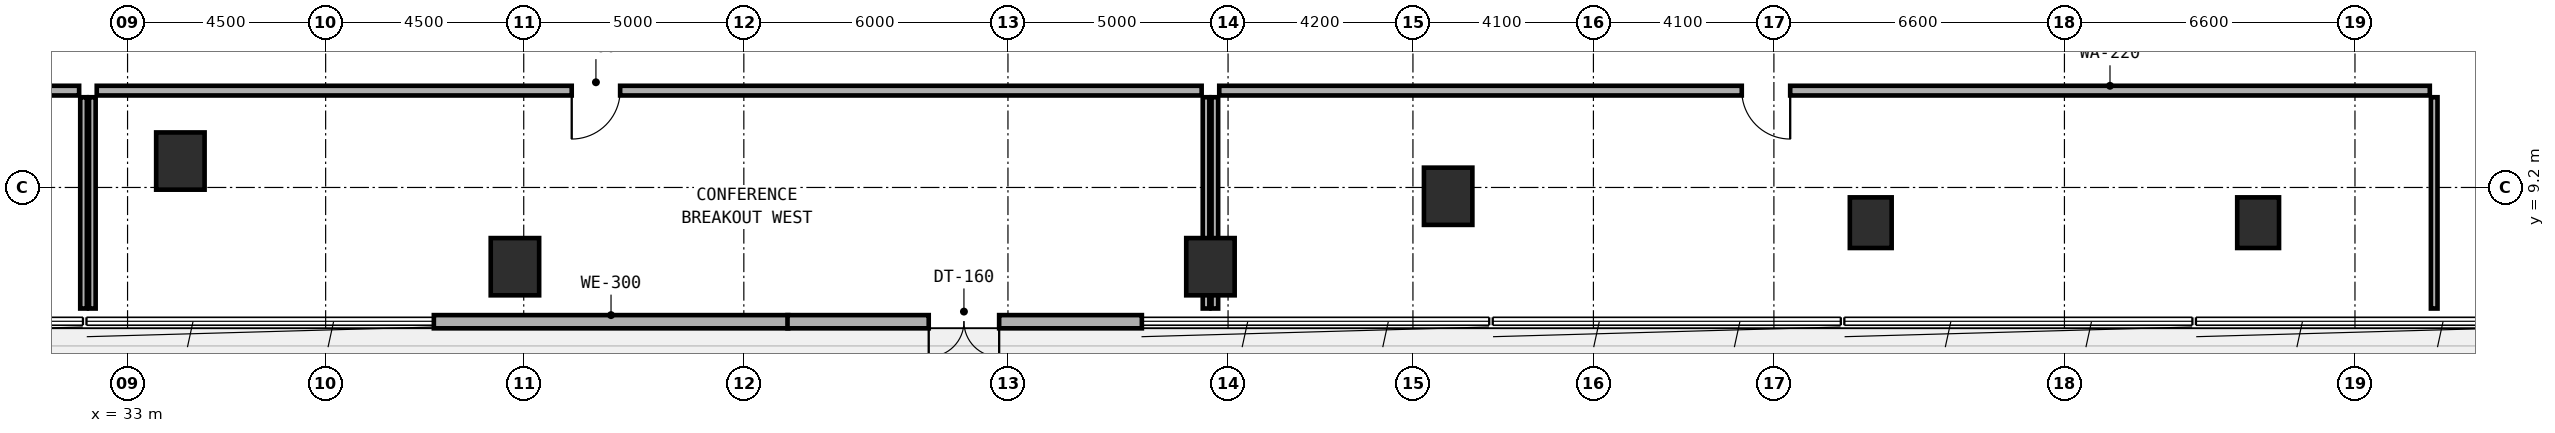
"""IFC4 building model, lengths in metres.
Left out: names, types, materials, properties, quantities, classifications, styles, units other than length and angle.
Written with IfcOpenShell. Run it as: python <this file> out.ifc"""

import sys

from ifc_helpers import new_model, si_unit, direction, frame, frame_2d, origin, origin_2d, place, context, subcontext, project, spatial, rectangle, extrude, element, fill, save


model = new_model("IFC4")
c1 = context("Model", 3, precision=1e-05, world=origin(), true_north=direction((0.0, 1.0)))
c2 = subcontext(c1, "Body", "Model", "MODEL_VIEW")
j1 = project(units=[si_unit("LENGTHUNIT", "METRE"), si_unit("PLANEANGLEUNIT", "RADIAN")], contexts=[c1])
p1 = place(None, origin())
s1 = spatial("IfcSite", under=j1, at=p1, CompositionType="ELEMENT")
p2 = place(p1, origin())
s2 = spatial("IfcBuilding", under=s1, at=p2, CompositionType="ELEMENT")
p3 = place(p2, frame((0.0, 0.0, 15.0)))
s3 = spatial("IfcBuildingStorey", under=s2, at=p3, CompositionType="ELEMENT", Elevation=15.0)
p4 = place(p3, frame((34.2, 9.8, 0.0), z_axis=(0.0, 0.0, 1.0), x_axis=(1.0, 0.0, 0.0)))
e1 = element("IfcColumn", 1, at=p4, inside=s3, PredefinedType="COLUMN", context=c2, shape_type="SweptSolid", body=[
    extrude(rectangle(XDim=1.1, YDim=1.3, at=origin_2d()), origin(), (0.0, 0.0, 1.0), 4.5),
])
for number, where, z_axis, x_axis in (
    (2, (72.6, 8.4, 0.0), (0.0, 0.0, 1.0), (1.0, 0.0, 0.0)),
    (3, (81.4, 8.4, 0.0), (0.0, 0.0, 1.0), (1.0, 0.0, 0.0)),
):
    element("IfcColumn", number, at=place(p3, frame(where, z_axis=z_axis, x_axis=x_axis)), inside=s3, PredefinedType="COLUMN", context=c2, shape_type="SweptSolid", body=[
        extrude(rectangle(XDim=0.95, YDim=1.15, at=origin_2d()), origin(), (0.0, 0.0, 1.0), 4.5),
    ])
for number, where, z_axis, x_axis in (
    (4, (63.0, 9.0, 0.0), (0.0, 0.0, 1.0), (1.0, 0.0, 0.0)),
    (5, (41.8, 7.4, 0.0), (0.0, 0.0, 1.0), (1.0, 0.0, 0.0)),
    (6, (57.6, 7.4, 0.0), (0.0, 0.0, 1.0), (1.0, 0.0, 0.0)),
):
    element("IfcColumn", number, at=place(p3, frame(where, z_axis=z_axis, x_axis=x_axis)), inside=s3, PredefinedType="COLUMN", context=c2, shape_type="SweptSolid", body=[
        extrude(rectangle(XDim=1.1, YDim=1.3, at=origin_2d()), origin(), (0.0, 0.0, 1.0), 4.5),
    ])
p5 = place(p3, frame((39.958, 6.15, 0.0), z_axis=(0.0, 0.0, 1.0), x_axis=(1.0, 0.0, 0.0)))
e7 = element("IfcWall", 7, at=p5, inside=s3, PredefinedType="STANDARD", context=c2, shape_type="SweptSolid", body=[
    extrude(rectangle(XDim=8.05, YDim=0.3, at=frame_2d((4.025, 0.0))), origin(), (0.0, 0.0, 1.0), 4.1),
])
p6 = place(p3, frame((47.992, 6.15, 0.0), z_axis=(0.0, 0.0, 1.0), x_axis=(1.0, 0.0, 0.0)))
e8 = element("IfcWall", 8, at=p6, inside=s3, PredefinedType="STANDARD", context=c2, shape_type="SweptSolid", body=[
    extrude(rectangle(XDim=8.05, YDim=0.3, at=frame_2d((4.025, 0.0))), origin(), (0.0, 0.0, 1.0), 4.1),
])
p7 = place(p6, frame((3.208, 0.0, 0.0)))
e9 = element("IfcOpeningElement", 9, at=p7, cuts=e8, PredefinedType="OPENING", context=c2, shape_type="SweptSolid", body=[
    extrude(rectangle(XDim=1.6, YDim=2.2, at=frame_2d((0.8, 1.1))), frame((0.0, 0.16, 0.0), z_axis=(0.0, -1.0, 0.0), x_axis=(1.0, 0.0, 0.0)), (0.0, 0.0, 1.0), 0.32),
])
p8 = place(p3, frame((32.0, 6.45, 0.0), z_axis=(0.0, 0.0, 1.0), x_axis=(0.0, 1.0, 0.0)))
e10 = element("IfcWall", 10, at=p8, inside=s3, PredefinedType="PARTITIONING", context=c2, shape_type="SweptSolid", body=[
    extrude(rectangle(XDim=4.8, YDim=0.15, at=frame_2d((2.4, 0.0))), origin(), (0.0, 0.0, 1.0), 3.625),
])
p9 = place(p3, frame((10.7, 11.4, 0.0), z_axis=(0.0, 0.0, 1.0), x_axis=(1.0, 0.0, 0.0)))
e11 = element("IfcWall", 11, at=p9, inside=s3, PredefinedType="SOLIDWALL", context=c2, shape_type="SweptSolid", body=[
    extrude(rectangle(XDim=21.2, YDim=0.22, at=frame_2d((10.6, 0.0))), origin(), (0.0, 0.0, 1.0), 3.175),
])
p10 = place(p9, frame((9.035, 0.0, 0.0)))
e12 = element("IfcOpeningElement", 12, at=p10, cuts=e11, PredefinedType="OPENING", context=c2, shape_type="SweptSolid", body=[
    extrude(rectangle(XDim=1.1, YDim=2.1, at=frame_2d((0.55, 1.05))), frame((0.0, 0.12, 0.0), z_axis=(0.0, -1.0, 0.0), x_axis=(1.0, 0.0, 0.0)), (0.0, 0.0, 1.0), 0.24),
])
p11 = place(p3, frame((32.2, 6.45, 0.0), z_axis=(0.0, 0.0, 1.0), x_axis=(0.0, 1.0, 0.0)))
e13 = element("IfcWall", 13, at=p11, inside=s3, PredefinedType="PARTITIONING", context=c2, shape_type="SweptSolid", body=[
    extrude(rectangle(XDim=4.8, YDim=0.15, at=frame_2d((2.4, 0.0))), origin(), (0.0, 0.0, 1.0), 3.625),
])
p12 = place(p3, frame((57.5, 6.45, 0.0), z_axis=(0.0, 0.0, 1.0), x_axis=(0.0, 1.0, 0.0)))
e14 = element("IfcWall", 14, at=p12, inside=s3, PredefinedType="PARTITIONING", context=c2, shape_type="SweptSolid", body=[
    extrude(rectangle(XDim=4.8, YDim=0.15, at=frame_2d((2.4, 0.0))), origin(), (0.0, 0.0, 1.0), 3.275),
])
p13 = place(p3, frame((32.3, 11.4, 0.0), z_axis=(0.0, 0.0, 1.0), x_axis=(1.0, 0.0, 0.0)))
e15 = element("IfcWall", 15, at=p13, inside=s3, PredefinedType="SOLIDWALL", context=c2, shape_type="SweptSolid", body=[
    extrude(rectangle(XDim=25.1, YDim=0.22, at=frame_2d((12.55, 0.0))), origin(), (0.0, 0.0, 1.0), 3.375),
])
p14 = place(p13, frame((10.79, 0.0, 0.0)))
e16 = element("IfcOpeningElement", 16, at=p14, cuts=e15, PredefinedType="OPENING", context=c2, shape_type="SweptSolid", body=[
    extrude(rectangle(XDim=1.1, YDim=2.1, at=frame_2d((0.55, 1.05))), frame((0.0, 0.12, 0.0), z_axis=(0.0, -1.0, 0.0), x_axis=(1.0, 0.0, 0.0)), (0.0, 0.0, 1.0), 0.24),
])
p15 = place(p3, frame((57.7, 6.45, 0.0), z_axis=(0.0, 0.0, 1.0), x_axis=(0.0, 1.0, 0.0)))
e17 = element("IfcWall", 17, at=p15, inside=s3, PredefinedType="PARTITIONING", context=c2, shape_type="SweptSolid", body=[
    extrude(rectangle(XDim=4.8, YDim=0.15, at=frame_2d((2.4, 0.0))), origin(), (0.0, 0.0, 1.0), 3.375),
])
p16 = place(p3, frame((85.4, 6.45, 0.0), z_axis=(0.0, 0.0, 1.0), x_axis=(0.0, 1.0, 0.0)))
e18 = element("IfcWall", 18, at=p16, inside=s3, PredefinedType="PARTITIONING", context=c2, shape_type="SweptSolid", body=[
    extrude(rectangle(XDim=4.8, YDim=0.15, at=frame_2d((2.4, 0.0))), origin(), (0.0, 0.0, 1.0), 3.715),
])
p17 = place(p3, frame((57.8, 11.4, 0.0), z_axis=(0.0, 0.0, 1.0), x_axis=(1.0, 0.0, 0.0)))
e19 = element("IfcWall", 19, at=p17, inside=s3, PredefinedType="SOLIDWALL", context=c2, shape_type="SweptSolid", body=[
    extrude(rectangle(XDim=27.5, YDim=0.22, at=frame_2d((13.75, 0.0))), origin(), (0.0, 0.0, 1.0), 3.575),
])
p18 = place(p17, frame((11.87, 0.0, 0.0)))
e20 = element("IfcOpeningElement", 20, at=p18, cuts=e19, PredefinedType="OPENING", context=c2, shape_type="SweptSolid", body=[
    extrude(rectangle(XDim=1.1, YDim=2.1, at=frame_2d((0.55, 1.05))), frame((0.0, 0.12, 0.0), z_axis=(0.0, -1.0, 0.0), x_axis=(1.0, 0.0, 0.0)), (0.0, 0.0, 1.0), 0.24),
])
p19 = place(p7, frame((1.6, 0.0, 0.0), z_axis=(0.0, 0.0, 1.0), x_axis=(-1.0, 0.0, 0.0)))
e21 = element("IfcDoor", 21, at=p19, inside=s3, OperationType="DOUBLE_DOOR_SINGLE_SWING", PredefinedType="DOOR", context=c2, shape_type="SweptSolid", body=[
    extrude(rectangle(XDim=1.6, YDim=2.2, at=frame_2d((0.8, 1.1))), frame((0.0, 0.025, 0.0), z_axis=(0.0, -1.0, 0.0), x_axis=(1.0, 0.0, 0.0)), (0.0, 0.0, 1.0), 0.05),
])
fill(e9, e21)
p20 = place(p14, frame((1.1, 0.0, 0.0), z_axis=(0.0, 0.0, 1.0), x_axis=(-1.0, 0.0, 0.0)))
e22 = element("IfcDoor", 22, at=p20, inside=s3, OperationType="SINGLE_SWING_RIGHT", PredefinedType="DOOR", context=c2, shape_type="SweptSolid", body=[
    extrude(rectangle(XDim=1.1, YDim=2.1, at=frame_2d((0.55, 1.05))), frame((0.0, 0.025, 0.0), z_axis=(0.0, -1.0, 0.0), x_axis=(1.0, 0.0, 0.0)), (0.0, 0.0, 1.0), 0.05),
])
fill(e16, e22)
p21 = place(p18, frame((1.1, 0.0, 0.0), z_axis=(0.0, 0.0, 1.0), x_axis=(-1.0, 0.0, 0.0)))
e23 = element("IfcDoor", 23, at=p21, inside=s3, OperationType="SINGLE_SWING_LEFT", PredefinedType="DOOR", context=c2, shape_type="SweptSolid", body=[
    extrude(rectangle(XDim=1.1, YDim=2.1, at=frame_2d((0.55, 1.05))), frame((0.0, 0.025, 0.0), z_axis=(0.0, -1.0, 0.0), x_axis=(1.0, 0.0, 0.0)), (0.0, 0.0, 1.0), 0.05),
])
fill(e20, e23)
save(model, sys.argv[1])
